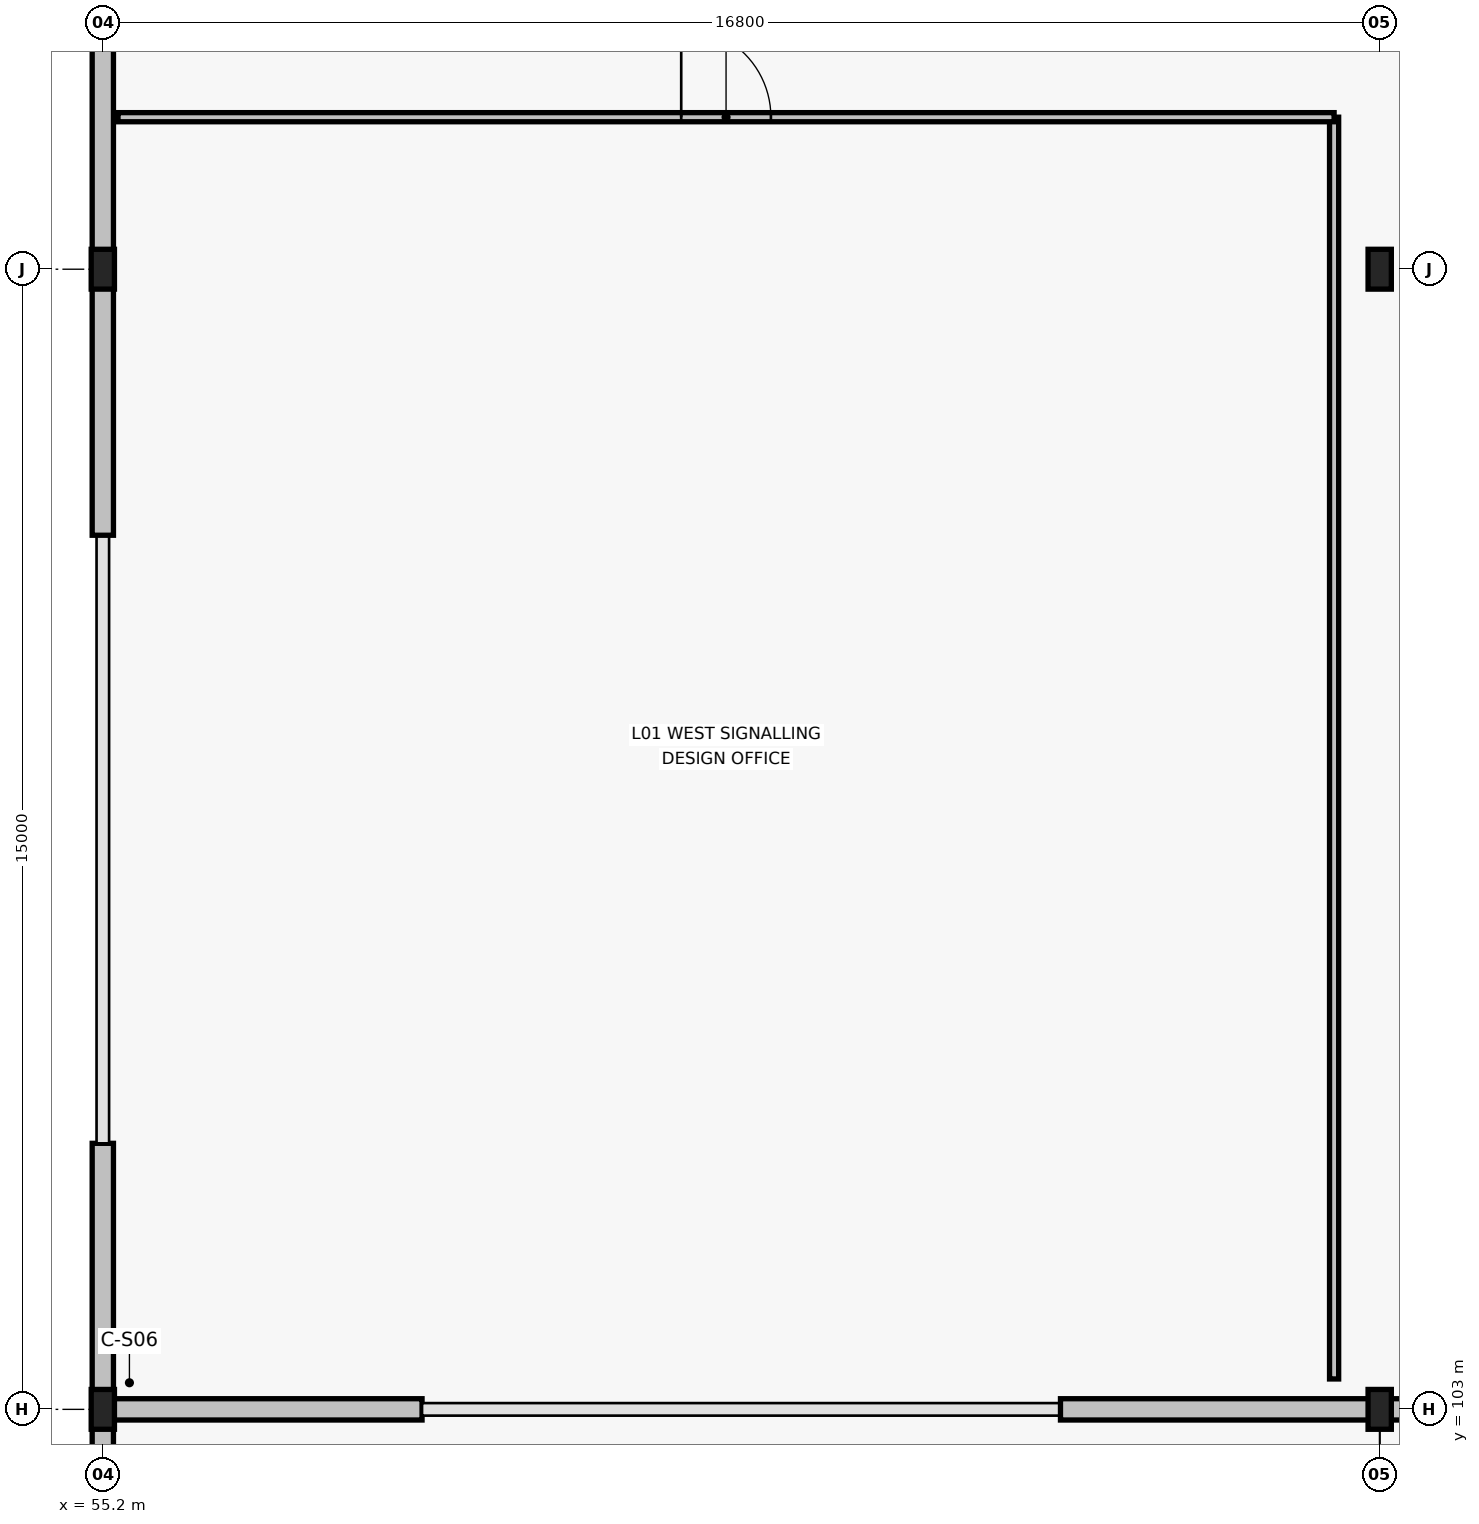
"""IFC4 building model, lengths in metres.
Left out: names, types, materials, properties, quantities, classifications, styles, units other than length and angle.
Written with IfcOpenShell. Run it as: python <this file> out.ifc"""

import sys

from ifc_helpers import new_model, si_unit, direction, frame, frame_2d, origin, origin_2d, place, context, subcontext, project, spatial, rectangle, i_section, extrude, element, fill, save


model = new_model("IFC4")
c1 = context("Model", 3, precision=1e-05, world=origin(), true_north=direction((0.0, 1.0)))
c2 = subcontext(c1, "Body", "Model", "MODEL_VIEW")
j1 = project(units=[si_unit("LENGTHUNIT", "METRE"), si_unit("PLANEANGLEUNIT", "RADIAN")], contexts=[c1])
p1 = place(None, origin())
s1 = spatial("IfcSite", under=j1, at=p1, CompositionType="ELEMENT")
p2 = place(p1, origin())
s2 = spatial("IfcBuilding", under=s1, at=p2, CompositionType="ELEMENT")
p3 = place(p2, frame((0.0, 0.0, 5.4)))
s3 = spatial("IfcBuildingStorey", under=s2, at=p3, CompositionType="ELEMENT", Elevation=5.4)
for number, where, z_axis, x_axis in (
    (1, (55.2, 103.0, 0.0), (0.0, 0.0, 1.0), (1.0, 0.0, 0.0)),
    (2, (55.2, 118.0, 0.0), (0.0, 0.0, 1.0), (1.0, 0.0, 0.0)),
    (3, (72.0, 103.0, 0.0), (0.0, 0.0, 1.0), (1.0, 0.0, 0.0)),
    (4, (72.0, 118.0, 0.0), (0.0, 0.0, 1.0), (1.0, 0.0, 0.0)),
):
    element("IfcColumn", number, at=place(p3, frame(where, z_axis=z_axis, x_axis=x_axis)), inside=s3, PredefinedType="COLUMN", context=c2, shape_type="SweptSolid", body=[
        extrude(i_section(OverallWidth=0.306, OverallDepth=0.524, WebThickness=0.021, FlangeThickness=0.04, FilletRadius=0.027, at=origin_2d()), origin(), (0.0, 0.0, 1.0), 5.4),
    ])
for number, where, z_axis, x_axis in (
    (5, (55.2, 103.0, 0.0), (0.0, 0.0, 1.0), (1.0, 0.0, 0.0)),
    (6, (67.8, 103.0, 0.0), (0.0, 0.0, 1.0), (1.0, 0.0, 0.0)),
    (7, (72.0, 103.0, 0.0), (0.0, 0.0, 1.0), (1.0, 0.0, 0.0)),
):
    element("IfcWall", number, at=place(p3, frame(where, z_axis=z_axis, x_axis=x_axis)), inside=s3, PredefinedType="STANDARD", context=c2, shape_type="SweptSolid", body=[
        extrude(rectangle(XDim=4.2, YDim=0.28, at=frame_2d((2.1, 0.0))), origin(), (0.0, 0.0, 1.0), 4.765),
    ])
p4 = place(p3, frame((55.2, 103.14, 0.0), z_axis=(0.0, 0.0, 1.0), x_axis=(0.0, 1.0, 0.0)))
e8 = element("IfcWall", 8, at=p4, inside=s3, PredefinedType="STANDARD", context=c2, shape_type="SweptSolid", body=[
    extrude(rectangle(XDim=3.36, YDim=0.28, at=frame_2d((1.68, 0.0))), origin(), (0.0, 0.0, 1.0), 4.765),
])
for number, where, z_axis, x_axis in (
    (9, (55.2, 114.5, 0.0), (0.0, 0.0, 1.0), (0.0, 1.0, 0.0)),
    (10, (55.2, 118.0, 0.0), (0.0, 0.0, 1.0), (0.0, 1.0, 0.0)),
):
    element("IfcWall", number, at=place(p3, frame(where, z_axis=z_axis, x_axis=x_axis)), inside=s3, PredefinedType="STANDARD", context=c2, shape_type="SweptSolid", body=[
        extrude(rectangle(XDim=3.5, YDim=0.28, at=frame_2d((1.75, 0.0))), origin(), (0.0, 0.0, 1.0), 4.765),
    ])
p5 = place(p3, frame((55.2, 96.8, 0.0), z_axis=(0.0, 0.0, 1.0), x_axis=(0.0, 1.0, 0.0)))
e11 = element("IfcWall", 11, at=p5, inside=s3, PredefinedType="STANDARD", context=c2, shape_type="SweptSolid", body=[
    extrude(rectangle(XDim=6.06, YDim=0.28, at=frame_2d((3.03, 0.0))), origin(), (0.0, 0.0, 1.0), 5.14),
])
p6 = place(p3, frame((71.4, 103.4, 0.0), z_axis=(0.0, 0.0, 1.0), x_axis=(0.0, 1.0, 0.0)))
e12 = element("IfcWall", 12, at=p6, inside=s3, PredefinedType="PARTITIONING", context=c2, shape_type="SweptSolid", body=[
    extrude(rectangle(XDim=16.6, YDim=0.12, at=frame_2d((8.3, 0.0))), origin(), (0.0, 0.0, 1.0), 4.655),
])
p7 = place(p3, frame((71.4, 120.0, 0.0), z_axis=(0.0, 0.0, 1.0), x_axis=(-1.0, 0.0, 0.0)))
e13 = element("IfcWall", 13, at=p7, inside=s3, PredefinedType="PARTITIONING", context=c2, shape_type="SweptSolid", body=[
    extrude(rectangle(XDim=16.0, YDim=0.12, at=frame_2d((8.0, 0.0))), origin(), (0.0, 0.0, 1.0), 5.16),
])
p8 = place(p7, frame((7.41, 0.0, 0.0)))
e14 = element("IfcOpeningElement", 14, at=p8, cuts=e13, PredefinedType="OPENING", context=c2, shape_type="SweptSolid", body=[
    extrude(rectangle(XDim=1.18, YDim=2.18, at=frame_2d((0.59, 1.09))), frame((0.0, 0.07, 0.0), z_axis=(0.0, -1.0, 0.0), x_axis=(1.0, 0.0, 0.0)), (0.0, 0.0, 1.0), 0.14),
])
p9 = place(p8, origin())
e15 = element("IfcDoor", 15, at=p9, inside=s3, OperationType="SINGLE_SWING_RIGHT", PredefinedType="DOOR", context=c2, shape_type="SweptSolid", body=[
    extrude(rectangle(XDim=1.18, YDim=2.18, at=frame_2d((0.59, 1.09))), frame((0.0, 0.025, 0.0), z_axis=(0.0, -1.0, 0.0), x_axis=(1.0, 0.0, 0.0)), (0.0, 0.0, 1.0), 0.05),
])
fill(e14, e15)
save(model, sys.argv[1])
